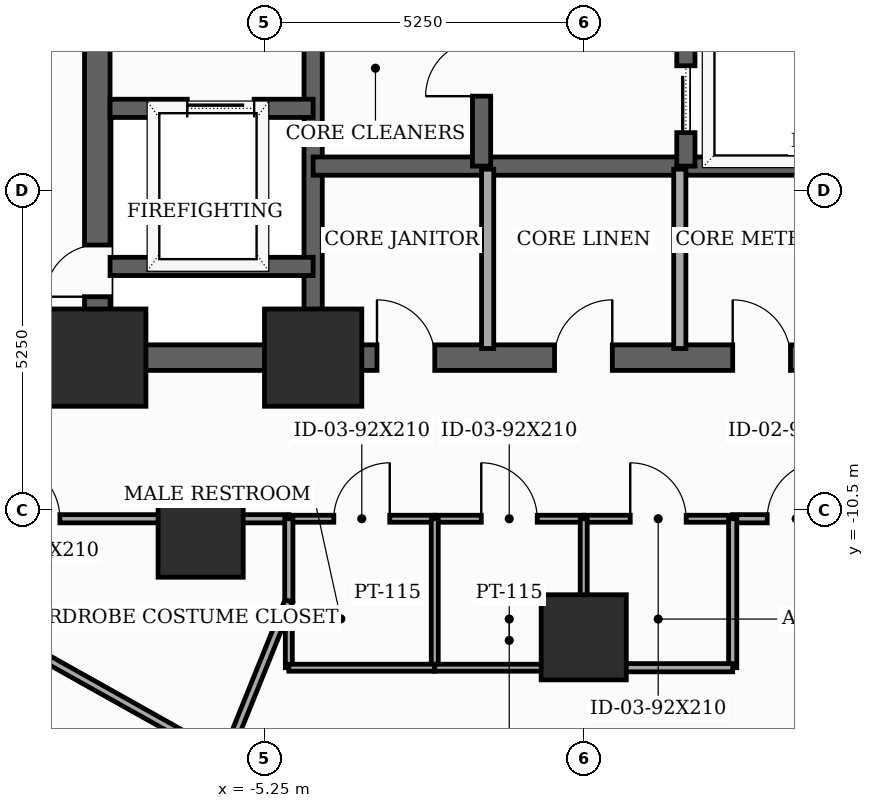
"""IFC4 building model, lengths in metres.
Left out: names, types, materials, properties, quantities, classifications, styles, units other than length and angle.
Written with IfcOpenShell. Run it as: python <this file> out.ifc"""

import sys

from ifc_helpers import new_model, si_unit, direction, frame, frame_2d, origin, origin_2d, place, context, subcontext, project, spatial, rectangle, extrude, element, fill, save


model = new_model("IFC4")
c1 = context("Model", 3, precision=1e-05, world=origin(), true_north=direction((0.0, 1.0)))
c2 = subcontext(c1, "Body", "Model", "MODEL_VIEW")
j1 = project(units=[si_unit("LENGTHUNIT", "METRE"), si_unit("PLANEANGLEUNIT", "RADIAN")], contexts=[c1])
p1 = place(None, origin())
s1 = spatial("IfcSite", under=j1, at=p1, CompositionType="ELEMENT")
p2 = place(p1, origin())
s2 = spatial("IfcBuilding", under=s1, at=p2, CompositionType="ELEMENT")
p3 = place(p2, frame((0.0, 0.0, 40.8)))
s3 = spatial("IfcBuildingStorey", under=s2, at=p3, CompositionType="ELEMENT", Elevation=40.8)
for number, where, z_axis, x_axis in (
    (1, (-8.0, -8.0, 0.0), (0.0, 0.0, 1.0), (1.0, 0.0, 0.0)),
    (2, (-4.45, -8.0, 0.0), (0.0, 0.0, 1.0), (1.0, 0.0, 0.0)),
):
    element("IfcColumn", number, at=place(p3, frame(where, z_axis=z_axis, x_axis=x_axis)), inside=s3, PredefinedType="COLUMN", context=c2, shape_type="SweptSolid", body=[
        extrude(rectangle(XDim=1.6, YDim=1.6, at=origin_2d()), origin(), (0.0, 0.0, 1.0), 3.7),
    ])
for number, where, z_axis, x_axis in (
    (3, (-6.3, -10.912, 0.0), (0.0, 0.0, 1.0), (1.0, 0.0, 0.0)),
    (4, (0.0, -12.6, 0.0), (0.0, 0.0, 1.0), (1.0, 0.0, 0.0)),
):
    element("IfcColumn", number, at=place(p3, frame(where, z_axis=z_axis, x_axis=x_axis)), inside=s3, PredefinedType="COLUMN", context=c2, shape_type="SweptSolid", body=[
        extrude(rectangle(XDim=1.4, YDim=1.4, at=origin_2d()), origin(), (0.0, 0.0, 1.0), 3.7),
    ])
p4 = place(p3, frame((-8.0, -8.0, 0.0), z_axis=(0.0, 0.0, 1.0), x_axis=(0.0, 1.0, 0.0)))
e5 = element("IfcWall", 5, at=p4, inside=s3, PredefinedType="SHEAR", context=c2, shape_type="SweptSolid", body=[
    extrude(rectangle(XDim=16.0, YDim=0.42, at=frame_2d((8.0, 0.0))), origin(), (0.0, 0.0, 1.0), 3.5),
])
p5 = place(p4, frame((1.002, 0.0, 0.0)))
e6 = element("IfcOpeningElement", 6, at=p5, cuts=e5, PredefinedType="OPENING", context=c2, shape_type="SweptSolid", body=[
    extrude(rectangle(XDim=0.85, YDim=2.02, at=frame_2d((0.425, 1.01))), frame((0.0, 0.22, 0.0), z_axis=(0.0, -1.0, 0.0), x_axis=(1.0, 0.0, 0.0)), (0.0, 0.0, 1.0), 0.44),
])
p6 = place(p4, frame((5.35, 0.0, 0.0)))
e7 = element("IfcOpeningElement", 7, at=p6, cuts=e5, PredefinedType="OPENING", context=c2, shape_type="SweptSolid", body=[
    extrude(rectangle(XDim=1.05, YDim=2.15, at=frame_2d((0.525, 1.075))), frame((0.0, 0.22, 0.0), z_axis=(0.0, -1.0, 0.0), x_axis=(1.0, 0.0, 0.0)), (0.0, 0.0, 1.0), 0.44),
])
p7 = place(p3, frame((-8.0, -8.0, 0.0), z_axis=(0.0, 0.0, 1.0), x_axis=(1.0, 0.0, 0.0)))
e8 = element("IfcWall", 8, at=p7, inside=s3, PredefinedType="SHEAR", context=c2, shape_type="SweptSolid", body=[
    extrude(rectangle(XDim=16.0, YDim=0.42, at=frame_2d((8.0, 0.0))), origin(), (0.0, 0.0, 1.0), 3.5),
])
p8 = place(p7, frame((4.6, 0.0, 0.0)))
e9 = element("IfcOpeningElement", 9, at=p8, cuts=e8, PredefinedType="OPENING", context=c2, shape_type="SweptSolid", body=[
    extrude(rectangle(XDim=0.95, YDim=2.1, at=frame_2d((0.475, 1.05))), frame((0.0, 0.22, 0.0), z_axis=(0.0, -1.0, 0.0), x_axis=(1.0, 0.0, 0.0)), (0.0, 0.0, 1.0), 0.44),
])
p9 = place(p7, frame((7.52, 0.0, 0.0)))
e10 = element("IfcOpeningElement", 10, at=p9, cuts=e8, PredefinedType="OPENING", context=c2, shape_type="SweptSolid", body=[
    extrude(rectangle(XDim=0.95, YDim=2.1, at=frame_2d((0.475, 1.05))), frame((0.0, 0.22, 0.0), z_axis=(0.0, -1.0, 0.0), x_axis=(1.0, 0.0, 0.0)), (0.0, 0.0, 1.0), 0.44),
])
p10 = place(p7, frame((10.45, 0.0, 0.0)))
e11 = element("IfcOpeningElement", 11, at=p10, cuts=e8, PredefinedType="OPENING", context=c2, shape_type="SweptSolid", body=[
    extrude(rectangle(XDim=0.95, YDim=2.1, at=frame_2d((0.475, 1.05))), frame((0.0, 0.22, 0.0), z_axis=(0.0, -1.0, 0.0), x_axis=(1.0, 0.0, 0.0)), (0.0, 0.0, 1.0), 0.44),
])
p11 = place(p3, frame((-4.45, -7.79, 0.0), z_axis=(0.0, 0.0, 1.0), x_axis=(0.0, 1.0, 0.0)))
e12 = element("IfcWall", 12, at=p11, inside=s3, PredefinedType="SHEAR", context=c2, shape_type="SweptSolid", body=[
    extrude(rectangle(XDim=15.58, YDim=0.3, at=frame_2d((7.79, 0.0))), origin(), (0.0, 0.0, 1.0), 3.5),
])
p12 = place(p3, frame((-7.79, -3.9, 0.0), z_axis=(0.0, 0.0, 1.0), x_axis=(1.0, 0.0, 0.0)))
e13 = element("IfcWall", 13, at=p12, inside=s3, PredefinedType="SHEAR", context=c2, shape_type="SweptSolid", body=[
    extrude(rectangle(XDim=3.34, YDim=0.3, at=frame_2d((1.67, 0.0))), origin(), (0.0, 0.0, 1.0), 3.5),
])
p13 = place(p12, frame((1.27, 0.0, 0.0)))
e14 = element("IfcOpeningElement", 14, at=p13, cuts=e13, PredefinedType="OPENING", context=c2, shape_type="SweptSolid", body=[
    extrude(rectangle(XDim=1.1, YDim=2.1, at=frame_2d((0.55, 1.05))), frame((0.0, 0.16, 0.0), z_axis=(0.0, -1.0, 0.0), x_axis=(1.0, 0.0, 0.0)), (0.0, 0.0, 1.0), 0.32),
])
p14 = place(p3, frame((-7.79, -6.5, 0.0), z_axis=(0.0, 0.0, 1.0), x_axis=(1.0, 0.0, 0.0)))
e15 = element("IfcWall", 15, at=p14, inside=s3, PredefinedType="SHEAR", context=c2, shape_type="SweptSolid", body=[
    extrude(rectangle(XDim=3.34, YDim=0.3, at=frame_2d((1.67, 0.0))), origin(), (0.0, 0.0, 1.0), 3.5),
])
p15 = place(p3, frame((-4.45, -4.85, 0.0), z_axis=(0.0, 0.0, 1.0), x_axis=(1.0, 0.0, 0.0)))
e16 = element("IfcWall", 16, at=p15, inside=s3, PredefinedType="SHEAR", context=c2, shape_type="SweptSolid", body=[
    extrude(rectangle(XDim=8.9, YDim=0.3, at=frame_2d((4.45, 0.0))), origin(), (0.0, 0.0, 1.0), 3.5),
])
p16 = place(p3, frame((-1.68, -4.85, 0.0), z_axis=(0.0, 0.0, 1.0), x_axis=(0.0, 1.0, 0.0)))
e17 = element("IfcWall", 17, at=p16, inside=s3, PredefinedType="SHEAR", context=c2, shape_type="SweptSolid", body=[
    extrude(rectangle(XDim=12.64, YDim=0.3, at=frame_2d((6.32, 0.0))), origin(), (0.0, 0.0, 1.0), 3.5),
])
p17 = place(p16, frame((3.95, 0.0, 0.0)))
e18 = element("IfcOpeningElement", 18, at=p17, cuts=e17, PredefinedType="OPENING", context=c2, shape_type="SweptSolid", body=[
    extrude(rectangle(XDim=1.1, YDim=2.1, at=frame_2d((0.55, 1.05))), frame((0.0, 0.16, 0.0), z_axis=(0.0, -1.0, 0.0), x_axis=(1.0, 0.0, 0.0)), (0.0, 0.0, 1.0), 0.32),
])
p18 = place(p16, frame((6.25, 0.0, 0.0)))
e19 = element("IfcOpeningElement", 19, at=p18, cuts=e17, PredefinedType="OPENING", context=c2, shape_type="SweptSolid", body=[
    extrude(rectangle(XDim=1.1, YDim=2.1, at=frame_2d((0.55, 1.05))), frame((0.0, 0.16, 0.0), z_axis=(0.0, -1.0, 0.0), x_axis=(1.0, 0.0, 0.0)), (0.0, 0.0, 1.0), 0.32),
])
p19 = place(p16, frame((8.55, 0.0, 0.0)))
e20 = element("IfcOpeningElement", 20, at=p19, cuts=e17, PredefinedType="OPENING", context=c2, shape_type="SweptSolid", body=[
    extrude(rectangle(XDim=1.1, YDim=2.1, at=frame_2d((0.55, 1.05))), frame((0.0, 0.16, 0.0), z_axis=(0.0, -1.0, 0.0), x_axis=(1.0, 0.0, 0.0)), (0.0, 0.0, 1.0), 0.32),
])
p20 = place(p16, frame((10.85, 0.0, 0.0)))
e21 = element("IfcOpeningElement", 21, at=p20, cuts=e17, PredefinedType="OPENING", context=c2, shape_type="SweptSolid", body=[
    extrude(rectangle(XDim=1.1, YDim=2.1, at=frame_2d((0.55, 1.05))), frame((0.0, 0.16, 0.0), z_axis=(0.0, -1.0, 0.0), x_axis=(1.0, 0.0, 0.0)), (0.0, 0.0, 1.0), 0.32),
])
p21 = place(p16, frame((1.15, 0.0, 0.0)))
e22 = element("IfcOpeningElement", 22, at=p21, cuts=e17, PredefinedType="OPENING", context=c2, shape_type="SweptSolid", body=[
    extrude(rectangle(XDim=0.92, YDim=2.1, at=frame_2d((0.46, 1.05))), frame((0.0, 0.16, 0.0), z_axis=(0.0, -1.0, 0.0), x_axis=(1.0, 0.0, 0.0)), (0.0, 0.0, 1.0), 0.32),
])
p22 = place(p3, frame((1.68, -4.85, 0.0), z_axis=(0.0, 0.0, 1.0), x_axis=(0.0, 1.0, 0.0)))
e23 = element("IfcWall", 23, at=p22, inside=s3, PredefinedType="SHEAR", context=c2, shape_type="SweptSolid", body=[
    extrude(rectangle(XDim=12.64, YDim=0.3, at=frame_2d((6.32, 0.0))), origin(), (0.0, 0.0, 1.0), 3.5),
])
p23 = place(p22, frame((0.55, 0.0, 0.0)))
e24 = element("IfcOpeningElement", 24, at=p23, cuts=e23, PredefinedType="OPENING", context=c2, shape_type="SweptSolid", body=[
    extrude(rectangle(XDim=1.1, YDim=2.1, at=frame_2d((0.55, 1.05))), frame((0.0, 0.16, 0.0), z_axis=(0.0, -1.0, 0.0), x_axis=(1.0, 0.0, 0.0)), (0.0, 0.0, 1.0), 0.32),
])
p24 = place(p22, frame((2.65, 0.0, 0.0)))
e25 = element("IfcOpeningElement", 25, at=p24, cuts=e23, PredefinedType="OPENING", context=c2, shape_type="SweptSolid", body=[
    extrude(rectangle(XDim=1.1, YDim=2.1, at=frame_2d((0.55, 1.05))), frame((0.0, 0.16, 0.0), z_axis=(0.0, -1.0, 0.0), x_axis=(1.0, 0.0, 0.0)), (0.0, 0.0, 1.0), 0.32),
])
p25 = place(p22, frame((4.75, 0.0, 0.0)))
e26 = element("IfcOpeningElement", 26, at=p25, cuts=e23, PredefinedType="OPENING", context=c2, shape_type="SweptSolid", body=[
    extrude(rectangle(XDim=1.1, YDim=2.1, at=frame_2d((0.55, 1.05))), frame((0.0, 0.16, 0.0), z_axis=(0.0, -1.0, 0.0), x_axis=(1.0, 0.0, 0.0)), (0.0, 0.0, 1.0), 0.32),
])
p26 = place(p22, frame((6.85, 0.0, 0.0)))
e27 = element("IfcOpeningElement", 27, at=p26, cuts=e23, PredefinedType="OPENING", context=c2, shape_type="SweptSolid", body=[
    extrude(rectangle(XDim=1.1, YDim=2.1, at=frame_2d((0.55, 1.05))), frame((0.0, 0.16, 0.0), z_axis=(0.0, -1.0, 0.0), x_axis=(1.0, 0.0, 0.0)), (0.0, 0.0, 1.0), 0.32),
])
p27 = place(p22, frame((8.95, 0.0, 0.0)))
e28 = element("IfcOpeningElement", 28, at=p27, cuts=e23, PredefinedType="OPENING", context=c2, shape_type="SweptSolid", body=[
    extrude(rectangle(XDim=1.1, YDim=2.1, at=frame_2d((0.55, 1.05))), frame((0.0, 0.16, 0.0), z_axis=(0.0, -1.0, 0.0), x_axis=(1.0, 0.0, 0.0)), (0.0, 0.0, 1.0), 0.32),
])
p28 = place(p22, frame((11.05, 0.0, 0.0)))
e29 = element("IfcOpeningElement", 29, at=p28, cuts=e23, PredefinedType="OPENING", context=c2, shape_type="SweptSolid", body=[
    extrude(rectangle(XDim=1.1, YDim=2.1, at=frame_2d((0.55, 1.05))), frame((0.0, 0.16, 0.0), z_axis=(0.0, -1.0, 0.0), x_axis=(1.0, 0.0, 0.0)), (0.0, 0.0, 1.0), 0.32),
])
for number, where, z_axis, x_axis in (
    (30, (-1.58, -7.85, 0.0), (0.0, 0.0, 1.0), (0.0, 1.0, 0.0)),
    (31, (1.58, -7.85, 0.0), (0.0, 0.0, 1.0), (0.0, 1.0, 0.0)),
):
    element("IfcWall", number, at=place(p3, frame(where, z_axis=z_axis, x_axis=x_axis)), inside=s3, PredefinedType="SOLIDWALL", context=c2, shape_type="SweptSolid", body=[
        extrude(rectangle(XDim=2.95, YDim=0.2, at=frame_2d((1.475, 0.0))), origin(), (0.0, 0.0, 1.0), 2.885),
    ])
p29 = place(p3, frame((-10.15, -10.65, 0.0), z_axis=(0.0, 0.0, 1.0), x_axis=(1.0, 0.0, 0.0)))
e32 = element("IfcWall", 32, at=p29, inside=s3, PredefinedType="PARTITIONING", context=c2, shape_type="SweptSolid", body=[
    extrude(rectangle(XDim=5.3, YDim=0.135, at=frame_2d((2.65, 0.0))), origin(), (0.0, 0.0, 1.0), 2.785),
])
p30 = place(p29, frame((0.585, 0.0, 0.0)))
e33 = element("IfcOpeningElement", 33, at=p30, cuts=e32, PredefinedType="OPENING", context=c2, shape_type="SweptSolid", body=[
    extrude(rectangle(XDim=0.95, YDim=2.1, at=frame_2d((0.475, 1.05))), frame((0.0, 0.077, 0.0), z_axis=(0.0, -1.0, 0.0), x_axis=(1.0, 0.0, 0.0)), (0.0, 0.0, 1.0), 0.155),
])
p31 = place(p3, frame((-4.85, -10.65, 0.0), z_axis=(0.0, 0.0, 1.0), x_axis=(1.0, 0.0, 0.0)))
e34 = element("IfcWall", 34, at=p31, inside=s3, PredefinedType="PARTITIONING", context=c2, shape_type="SweptSolid", body=[
    extrude(rectangle(XDim=2.4, YDim=0.115, at=frame_2d((1.2, 0.0))), origin(), (0.0, 0.0, 1.0), 3.5),
])
p32 = place(p31, frame((0.74, 0.0, 0.0)))
e35 = element("IfcOpeningElement", 35, at=p32, cuts=e34, PredefinedType="OPENING", context=c2, shape_type="SweptSolid", body=[
    extrude(rectangle(XDim=0.92, YDim=2.1, at=frame_2d((0.46, 1.05))), frame((0.0, 0.067, 0.0), z_axis=(0.0, -1.0, 0.0), x_axis=(1.0, 0.0, 0.0)), (0.0, 0.0, 1.0), 0.135),
])
p33 = place(p3, frame((-2.45, -10.65, 0.0), z_axis=(0.0, 0.0, 1.0), x_axis=(1.0, 0.0, 0.0)))
e36 = element("IfcWall", 36, at=p33, inside=s3, PredefinedType="PARTITIONING", context=c2, shape_type="SweptSolid", body=[
    extrude(rectangle(XDim=2.45, YDim=0.115, at=frame_2d((1.225, 0.0))), origin(), (0.0, 0.0, 1.0), 2.785),
])
p34 = place(p33, frame((0.765, 0.0, 0.0)))
e37 = element("IfcOpeningElement", 37, at=p34, cuts=e36, PredefinedType="OPENING", context=c2, shape_type="SweptSolid", body=[
    extrude(rectangle(XDim=0.92, YDim=2.1, at=frame_2d((0.46, 1.05))), frame((0.0, 0.067, 0.0), z_axis=(0.0, -1.0, 0.0), x_axis=(1.0, 0.0, 0.0)), (0.0, 0.0, 1.0), 0.135),
])
p35 = place(p3, frame((2.45, -10.65, 0.0), z_axis=(0.0, 0.0, 1.0), x_axis=(1.0, 0.0, 0.0)))
e38 = element("IfcWall", 38, at=p35, inside=s3, PredefinedType="PARTITIONING", context=c2, shape_type="SweptSolid", body=[
    extrude(rectangle(XDim=2.744, YDim=0.135, at=frame_2d((1.372, 0.0))), origin(), (0.0, 0.0, 1.0), 3.5),
])
p36 = place(p35, frame((0.568, 0.0, 0.0)))
e39 = element("IfcOpeningElement", 39, at=p36, cuts=e38, PredefinedType="OPENING", context=c2, shape_type="SweptSolid", body=[
    extrude(rectangle(XDim=0.95, YDim=2.1, at=frame_2d((0.475, 1.05))), frame((0.0, 0.077, 0.0), z_axis=(0.0, -1.0, 0.0), x_axis=(1.0, 0.0, 0.0)), (0.0, 0.0, 1.0), 0.155),
])
p37 = place(p3, frame((0.0, -10.65, 0.0), z_axis=(0.0, 0.0, 1.0), x_axis=(1.0, 0.0, 0.0)))
e40 = element("IfcWall", 40, at=p37, inside=s3, PredefinedType="PARTITIONING", context=c2, shape_type="SweptSolid", body=[
    extrude(rectangle(XDim=2.45, YDim=0.115, at=frame_2d((1.225, 0.0))), origin(), (0.0, 0.0, 1.0), 3.5),
])
p38 = place(p37, frame((0.765, 0.0, 0.0)))
e41 = element("IfcOpeningElement", 41, at=p38, cuts=e40, PredefinedType="OPENING", context=c2, shape_type="SweptSolid", body=[
    extrude(rectangle(XDim=0.92, YDim=2.1, at=frame_2d((0.46, 1.05))), frame((0.0, 0.067, 0.0), z_axis=(0.0, -1.0, 0.0), x_axis=(1.0, 0.0, 0.0)), (0.0, 0.0, 1.0), 0.135),
])
p39 = place(p3, frame((-5.897, -14.596, 0.0), z_axis=(0.0, 0.0, 1.0), x_axis=(-0.87248894478, 0.488633851915, 0.0)))
e42 = element("IfcWall", 42, at=p39, inside=s3, PredefinedType="PARTITIONING", context=c2, shape_type="SweptSolid", body=[
    extrude(rectangle(XDim=4.39, YDim=0.135, at=frame_2d((2.195, 0.0))), origin(), (0.0, 0.0, 1.0), 2.685),
])
p40 = place(p3, frame((-4.85, -12.004, 0.0), z_axis=(0.0, 0.0, 1.0), x_axis=(0.0, 1.0, 0.0)))
e43 = element("IfcWall", 43, at=p40, inside=s3, PredefinedType="PARTITIONING", context=c2, shape_type="SweptSolid", body=[
    extrude(rectangle(XDim=1.354, YDim=0.135, at=frame_2d((0.677, 0.0))), origin(), (0.0, 0.0, 1.0), 2.785),
])
p41 = place(p3, frame((-5.897, -14.596, 0.0), z_axis=(0.0, 0.0, 1.0), x_axis=(0.374490485533, 0.92723075674, 0.0)))
e44 = element("IfcWall", 44, at=p41, inside=s3, PredefinedType="PARTITIONING", context=c2, shape_type="SweptSolid", body=[
    extrude(rectangle(XDim=2.795, YDim=0.135, at=frame_2d((1.398, 0.0))), origin(), (0.0, 0.0, 1.0), 2.685),
])
p42 = place(p3, frame((-2.45, -13.1, 0.0), z_axis=(0.0, 0.0, 1.0), x_axis=(0.0, 1.0, 0.0)))
e45 = element("IfcWall", 45, at=p42, inside=s3, PredefinedType="PARTITIONING", context=c2, shape_type="SweptSolid", body=[
    extrude(rectangle(XDim=2.45, YDim=0.115, at=frame_2d((1.225, 0.0))), origin(), (0.0, 0.0, 1.0), 2.785),
])
p43 = place(p3, frame((-4.85, -12.298, 0.0), z_axis=(0.0, 0.0, 1.0), x_axis=(0.0, -1.0, 0.0)))
e46 = element("IfcWall", 46, at=p43, inside=s3, PredefinedType="PARTITIONING", context=c2, shape_type="SweptSolid", body=[
    extrude(rectangle(XDim=0.802, YDim=0.115, at=frame_2d((0.401, 0.0))), origin(), (0.0, 0.0, 1.0), 3.5),
])
p44 = place(p3, frame((-4.85, -13.1, 0.0), z_axis=(0.0, 0.0, 1.0), x_axis=(1.0, 0.0, 0.0)))
e47 = element("IfcWall", 47, at=p44, inside=s3, PredefinedType="PARTITIONING", context=c2, shape_type="SweptSolid", body=[
    extrude(rectangle(XDim=2.4, YDim=0.115, at=frame_2d((1.2, 0.0))), origin(), (0.0, 0.0, 1.0), 3.5),
])
p45 = place(p3, frame((-2.45, -13.1, 0.0), z_axis=(0.0, 0.0, 1.0), x_axis=(1.0, 0.0, 0.0)))
e48 = element("IfcWall", 48, at=p45, inside=s3, PredefinedType="PARTITIONING", context=c2, shape_type="SweptSolid", body=[
    extrude(rectangle(XDim=2.45, YDim=0.115, at=frame_2d((1.225, 0.0))), origin(), (0.0, 0.0, 1.0), 2.085),
])
p46 = place(p3, frame((0.0, -13.1, 0.0), z_axis=(0.0, 0.0, 1.0), x_axis=(0.0, 1.0, 0.0)))
e49 = element("IfcWall", 49, at=p46, inside=s3, PredefinedType="PARTITIONING", context=c2, shape_type="SweptSolid", body=[
    extrude(rectangle(XDim=2.45, YDim=0.115, at=frame_2d((1.225, 0.0))), origin(), (0.0, 0.0, 1.0), 2.085),
])
p47 = place(p3, frame((2.45, -10.65, 0.0), z_axis=(0.0, 0.0, 1.0), x_axis=(0.0, -1.0, 0.0)))
e50 = element("IfcWall", 50, at=p47, inside=s3, PredefinedType="PARTITIONING", context=c2, shape_type="SweptSolid", body=[
    extrude(rectangle(XDim=2.45, YDim=0.135, at=frame_2d((1.225, 0.0))), origin(), (0.0, 0.0, 1.0), 2.785),
])
p48 = place(p3, frame((2.45, -13.1, 0.0), z_axis=(0.0, 0.0, 1.0), x_axis=(-1.0, 0.0, 0.0)))
e51 = element("IfcWall", 51, at=p48, inside=s3, PredefinedType="PARTITIONING", context=c2, shape_type="SweptSolid", body=[
    extrude(rectangle(XDim=2.45, YDim=0.135, at=frame_2d((1.225, 0.0))), origin(), (0.0, 0.0, 1.0), 2.085),
])
p49 = place(p5, origin())
e52 = element("IfcDoor", 52, at=p49, inside=s3, OperationType="SINGLE_SWING_LEFT", PredefinedType="TRAPDOOR", context=c2, shape_type="SweptSolid", body=[
    extrude(rectangle(XDim=0.85, YDim=2.02, at=frame_2d((0.425, 1.01))), frame((0.0, 0.025, 0.0), z_axis=(0.0, -1.0, 0.0), x_axis=(1.0, 0.0, 0.0)), (0.0, 0.0, 1.0), 0.05),
])
fill(e6, e52)
p50 = place(p8, origin())
e53 = element("IfcDoor", 53, at=p50, inside=s3, OperationType="SINGLE_SWING_LEFT", PredefinedType="DOOR", context=c2, shape_type="SweptSolid", body=[
    extrude(rectangle(XDim=0.95, YDim=2.1, at=frame_2d((0.475, 1.05))), frame((0.0, 0.025, 0.0), z_axis=(0.0, -1.0, 0.0), x_axis=(1.0, 0.0, 0.0)), (0.0, 0.0, 1.0), 0.05),
])
fill(e9, e53)
p51 = place(p9, origin())
e54 = element("IfcDoor", 54, at=p51, inside=s3, OperationType="SINGLE_SWING_RIGHT", PredefinedType="DOOR", context=c2, shape_type="SweptSolid", body=[
    extrude(rectangle(XDim=0.95, YDim=2.1, at=frame_2d((0.475, 1.05))), frame((0.0, 0.025, 0.0), z_axis=(0.0, -1.0, 0.0), x_axis=(1.0, 0.0, 0.0)), (0.0, 0.0, 1.0), 0.05),
])
fill(e10, e54)
p52 = place(p10, origin())
e55 = element("IfcDoor", 55, at=p52, inside=s3, OperationType="SINGLE_SWING_LEFT", PredefinedType="DOOR", context=c2, shape_type="SweptSolid", body=[
    extrude(rectangle(XDim=0.95, YDim=2.1, at=frame_2d((0.475, 1.05))), frame((0.0, 0.025, 0.0), z_axis=(0.0, -1.0, 0.0), x_axis=(1.0, 0.0, 0.0)), (0.0, 0.0, 1.0), 0.05),
])
fill(e11, e55)
p53 = place(p13, origin())
e56 = element("IfcDoor", 56, at=p53, inside=s3, OperationType="SLIDING_TO_LEFT", PredefinedType="DOOR", context=c2, shape_type="SweptSolid", body=[
    extrude(rectangle(XDim=1.1, YDim=2.1, at=frame_2d((0.55, 1.05))), frame((0.0, 0.025, 0.0), z_axis=(0.0, -1.0, 0.0), x_axis=(1.0, 0.0, 0.0)), (0.0, 0.0, 1.0), 0.05),
])
fill(e14, e56)
p54 = place(p21, origin())
e57 = element("IfcDoor", 57, at=p54, inside=s3, OperationType="SINGLE_SWING_LEFT", PredefinedType="DOOR", context=c2, shape_type="SweptSolid", body=[
    extrude(rectangle(XDim=0.92, YDim=2.1, at=frame_2d((0.46, 1.05))), frame((0.0, 0.025, 0.0), z_axis=(0.0, -1.0, 0.0), x_axis=(1.0, 0.0, 0.0)), (0.0, 0.0, 1.0), 0.05),
])
fill(e22, e57)
p55 = place(p23, origin())
e58 = element("IfcDoor", 58, at=p55, inside=s3, OperationType="SLIDING_TO_LEFT", PredefinedType="DOOR", context=c2, shape_type="SweptSolid", body=[
    extrude(rectangle(XDim=1.1, YDim=2.1, at=frame_2d((0.55, 1.05))), frame((0.0, 0.025, 0.0), z_axis=(0.0, -1.0, 0.0), x_axis=(1.0, 0.0, 0.0)), (0.0, 0.0, 1.0), 0.05),
])
fill(e24, e58)
p56 = place(p30, origin())
e59 = element("IfcDoor", 59, at=p56, inside=s3, OperationType="SINGLE_SWING_LEFT", PredefinedType="DOOR", context=c2, shape_type="SweptSolid", body=[
    extrude(rectangle(XDim=0.95, YDim=2.1, at=frame_2d((0.475, 1.05))), frame((0.0, 0.025, 0.0), z_axis=(0.0, -1.0, 0.0), x_axis=(1.0, 0.0, 0.0)), (0.0, 0.0, 1.0), 0.05),
])
fill(e33, e59)
p57 = place(p32, origin())
e60 = element("IfcDoor", 60, at=p57, inside=s3, OperationType="SINGLE_SWING_RIGHT", PredefinedType="DOOR", context=c2, shape_type="SweptSolid", body=[
    extrude(rectangle(XDim=0.92, YDim=2.1, at=frame_2d((0.46, 1.05))), frame((0.0, 0.025, 0.0), z_axis=(0.0, -1.0, 0.0), x_axis=(1.0, 0.0, 0.0)), (0.0, 0.0, 1.0), 0.05),
])
fill(e35, e60)
p58 = place(p34, origin())
e61 = element("IfcDoor", 61, at=p58, inside=s3, OperationType="SINGLE_SWING_LEFT", PredefinedType="DOOR", context=c2, shape_type="SweptSolid", body=[
    extrude(rectangle(XDim=0.92, YDim=2.1, at=frame_2d((0.46, 1.05))), frame((0.0, 0.025, 0.0), z_axis=(0.0, -1.0, 0.0), x_axis=(1.0, 0.0, 0.0)), (0.0, 0.0, 1.0), 0.05),
])
fill(e37, e61)
p59 = place(p36, origin())
e62 = element("IfcDoor", 62, at=p59, inside=s3, OperationType="SINGLE_SWING_RIGHT", PredefinedType="DOOR", context=c2, shape_type="SweptSolid", body=[
    extrude(rectangle(XDim=0.95, YDim=2.1, at=frame_2d((0.475, 1.05))), frame((0.0, 0.025, 0.0), z_axis=(0.0, -1.0, 0.0), x_axis=(1.0, 0.0, 0.0)), (0.0, 0.0, 1.0), 0.05),
])
fill(e39, e62)
p60 = place(p38, origin())
e63 = element("IfcDoor", 63, at=p60, inside=s3, OperationType="SINGLE_SWING_LEFT", PredefinedType="DOOR", context=c2, shape_type="SweptSolid", body=[
    extrude(rectangle(XDim=0.92, YDim=2.1, at=frame_2d((0.46, 1.05))), frame((0.0, 0.025, 0.0), z_axis=(0.0, -1.0, 0.0), x_axis=(1.0, 0.0, 0.0)), (0.0, 0.0, 1.0), 0.05),
])
fill(e41, e63)
save(model, sys.argv[1])
